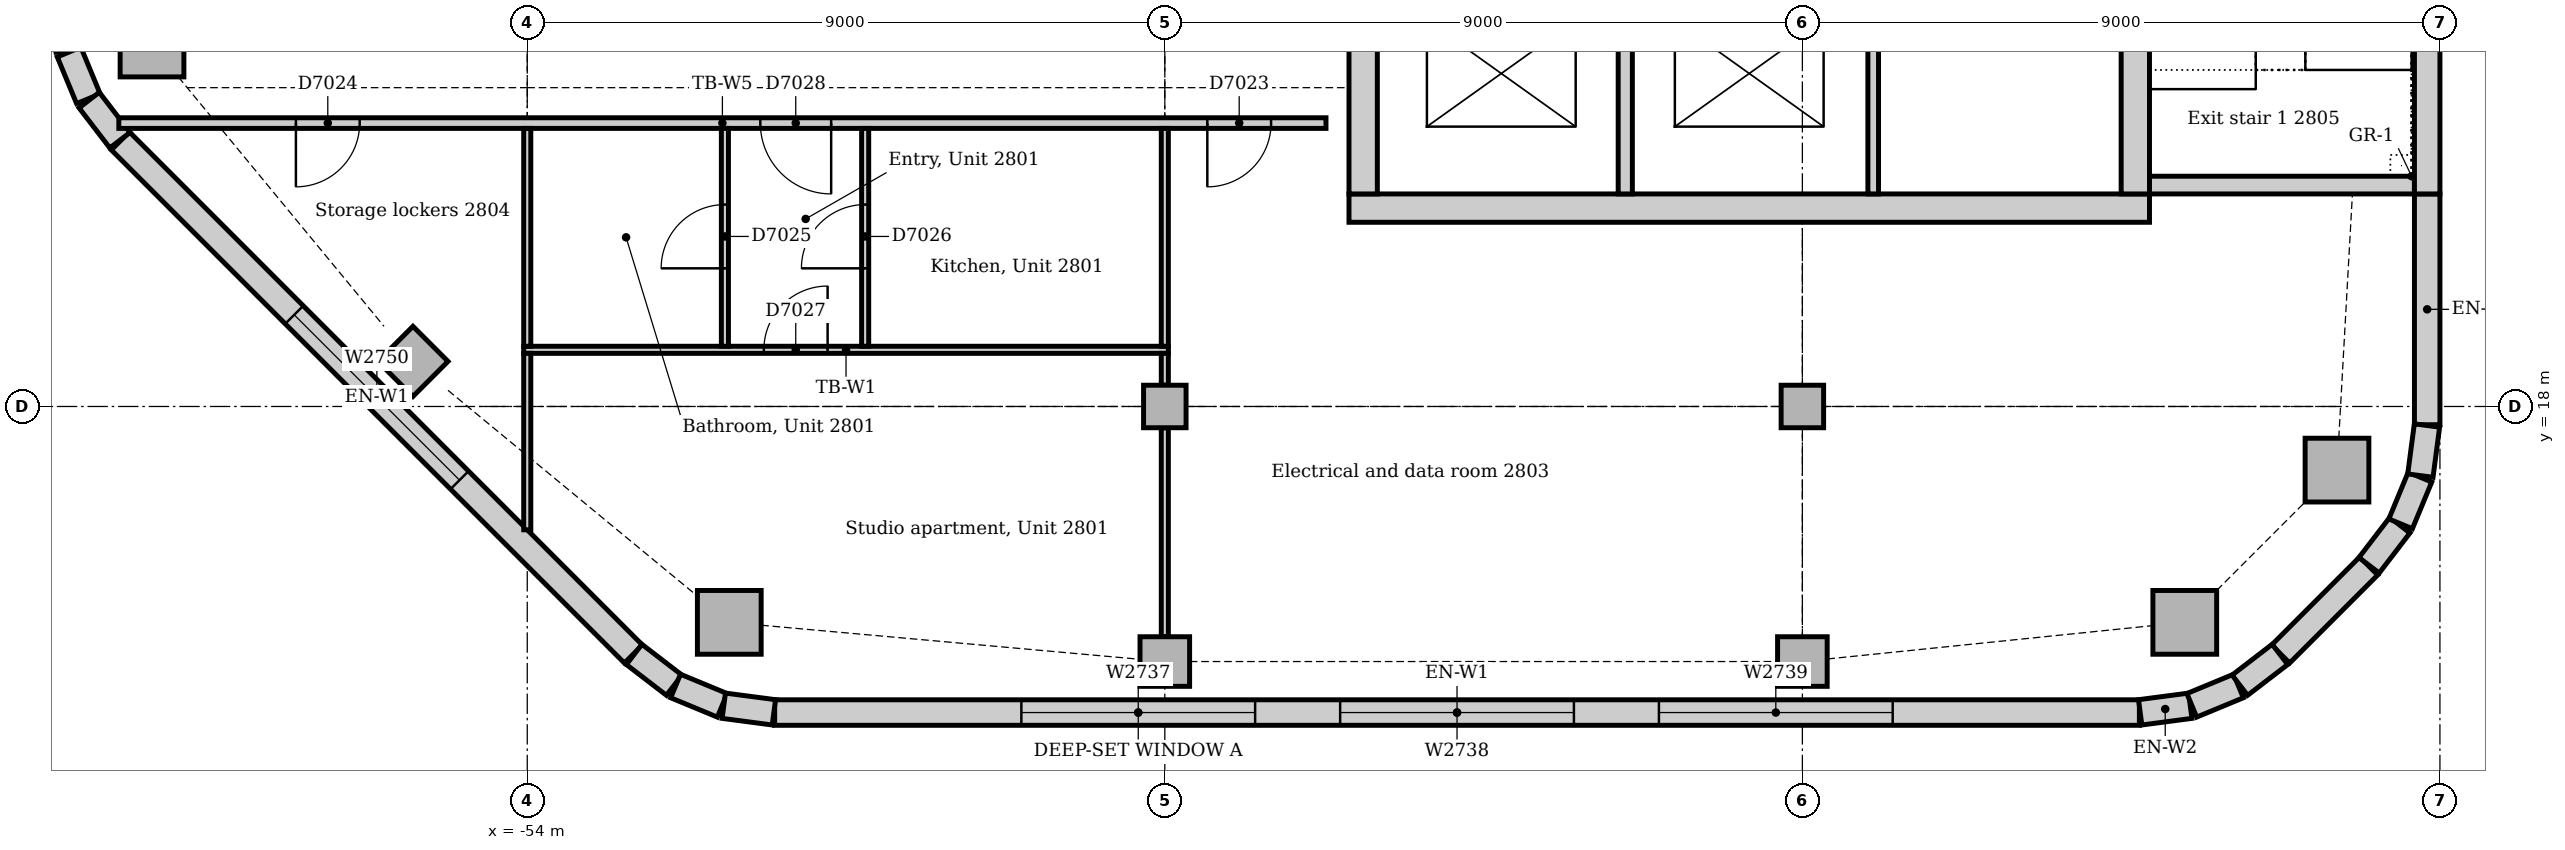
"""IFC4 building model, lengths in metres.
Left out: names, types, materials, properties, quantities, classifications, styles, units other than length and angle.
Written with IfcOpenShell. Run it as: python <this file> out.ifc"""

import sys

from ifc_helpers import new_model, si_unit, direction, frame, frame_2d, origin, origin_2d, place, context, subcontext, project, spatial, rectangle, extrude, element, fill, save


model = new_model("IFC4")
c1 = context("Model", 3, precision=1e-05, world=origin(), true_north=direction((0.0, 1.0)))
c2 = subcontext(c1, "Body", "Model", "MODEL_VIEW")
j1 = project(units=[si_unit("LENGTHUNIT", "METRE"), si_unit("PLANEANGLEUNIT", "RADIAN")], contexts=[c1])
p1 = place(None, origin())
s1 = spatial("IfcSite", under=j1, at=p1, CompositionType="ELEMENT")
p2 = place(p1, origin())
s2 = spatial("IfcBuilding", under=s1, at=p2, CompositionType="ELEMENT")
p3 = place(p2, frame((0.0, 0.0, 120.0)))
s3 = spatial("IfcBuildingStorey", under=s2, at=p3, CompositionType="ELEMENT", Elevation=120.0)
p4 = place(p3, frame((-42.4, 20.8, 0.0), z_axis=(0.0, 0.0, 1.0), x_axis=(1.0, 0.0, 0.0)))
e1 = element("IfcWall", 1, at=p4, inside=s3, PredefinedType="SOLIDWALL", context=c2, shape_type="SweptSolid", body=[
    extrude(rectangle(XDim=11.3, YDim=0.4, at=frame_2d((5.65, 0.0))), origin(), (0.0, 0.0, 1.0), 4.0),
])
p5 = place(p3, frame((-31.3, 21.0, 0.0), z_axis=(0.0, 0.0, 1.0), x_axis=(0.0, 1.0, 0.0)))
e2 = element("IfcWall", 2, at=p5, inside=s3, PredefinedType="SOLIDWALL", context=c2, shape_type="SweptSolid", body=[
    extrude(rectangle(XDim=9.5, YDim=0.4, at=frame_2d((4.75, 0.0))), origin(), (0.0, 0.0, 1.0), 4.0),
])
p6 = place(p5, frame((5.25, 0.0, 0.0)))
e3 = element("IfcOpeningElement", 3, at=p6, cuts=e2, PredefinedType="OPENING", context=c2, shape_type="SweptSolid", body=[
    extrude(rectangle(XDim=1.0, YDim=2.1, at=frame_2d((0.5, 1.05))), frame((0.0, 0.21, 0.0), z_axis=(0.0, -1.0, 0.0), x_axis=(1.0, 0.0, 0.0)), (0.0, 0.0, 1.0), 0.42),
])
p7 = place(p3, frame((-42.2, 30.5, 0.0), z_axis=(0.0, 0.0, 1.0), x_axis=(0.0, -1.0, 0.0)))
e4 = element("IfcWall", 4, at=p7, inside=s3, PredefinedType="SOLIDWALL", context=c2, shape_type="SweptSolid", body=[
    extrude(rectangle(XDim=9.5, YDim=0.4, at=frame_2d((4.75, 0.0))), origin(), (0.0, 0.0, 1.0), 4.0),
])
p8 = place(p7, frame((3.85, 0.0, 0.0)))
e5 = element("IfcOpeningElement", 5, at=p8, cuts=e4, PredefinedType="OPENING", context=c2, shape_type="SweptSolid", body=[
    extrude(rectangle(XDim=1.8, YDim=2.1, at=frame_2d((0.9, 1.05))), frame((0.0, 0.21, 0.0), z_axis=(0.0, -1.0, 0.0), x_axis=(1.0, 0.0, 0.0)), (0.0, 0.0, 1.0), 0.42),
])
p9 = place(p3, frame((-31.1, 21.125, 0.0), z_axis=(0.0, 0.0, 1.0), x_axis=(1.0, 0.0, 0.0)))
e6 = element("IfcWall", 6, at=p9, inside=s3, PredefinedType="SOLIDWALL", context=c2, shape_type="SweptSolid", body=[
    extrude(rectangle(XDim=3.74, YDim=0.25, at=frame_2d((1.87, 0.0))), origin(), (0.0, 0.0, 1.0), 4.0),
])
for number, where, z_axis, x_axis in (
    (7, (-51.148, 14.953, 0.0), (0.0, 0.0, 1.0), (1.0, 0.0, 0.0)),
    (8, (-30.602, 14.953, 0.0), (0.0, 0.0, 1.0), (1.0, 0.0, 0.0)),
    (9, (-28.453, 17.102, 0.0), (0.0, 0.0, 1.0), (1.0, 0.0, 0.0)),
    (10, (-59.297, 23.102, 0.0), (0.0, 0.0, 1.0), (1.0, 0.0, 0.0)),
):
    element("IfcColumn", number, at=place(p3, frame(where, z_axis=z_axis, x_axis=x_axis)), inside=s3, PredefinedType="COLUMN", context=c2, shape_type="SweptSolid", body=[
        extrude(rectangle(XDim=0.9, YDim=0.9, at=origin_2d()), origin(), (0.0, 0.0, 1.0), 3.85),
    ])
for number, where, z_axis, x_axis in (
    (11, (-45.0, 14.4, 0.0), (0.0, 0.0, 1.0), (1.0, 0.0, 0.0)),
    (12, (-36.0, 14.4, 0.0), (0.0, 0.0, 1.0), (1.0, 0.0, 0.0)),
    (13, (-55.614, 18.636, 0.0), (0.0, 0.0, 1.0), (0.707, 0.707, 0.0)),
):
    element("IfcColumn", number, at=place(p3, frame(where, z_axis=z_axis, x_axis=x_axis)), inside=s3, PredefinedType="COLUMN", context=c2, shape_type="SweptSolid", body=[
        extrude(rectangle(XDim=0.7, YDim=0.7, at=origin_2d()), origin(), (0.0, 0.0, 1.0), 3.85),
    ])
for number, where, z_axis, x_axis in (
    (14, (-45.0, 18.0, 0.0), (0.0, 0.0, 1.0), (1.0, 0.0, 0.0)),
    (15, (-36.0, 18.0, 0.0), (0.0, 0.0, 1.0), (1.0, 0.0, 0.0)),
):
    element("IfcColumn", number, at=place(p3, frame(where, z_axis=z_axis, x_axis=x_axis)), inside=s3, PredefinedType="COLUMN", context=c2, shape_type="SweptSolid", body=[
        extrude(rectangle(XDim=0.6, YDim=0.6, at=origin_2d()), origin(), (0.0, 0.0, 1.0), 3.85),
    ])
p10 = place(p3, frame((-50.507, 13.68, 0.0), z_axis=(0.0, 0.0, 1.0), x_axis=(1.0, 0.0, 0.0)))
e16 = element("IfcWall", 16, at=p10, inside=s3, PredefinedType="STANDARD", context=c2, shape_type="SweptSolid", body=[
    extrude(rectangle(XDim=19.265, YDim=0.36, at=frame_2d((9.632, 0.0))), origin(), (0.0, 0.0, 1.0), 3.85),
])
p11 = place(p10, frame((3.482, 0.0, 0.9)))
e17 = element("IfcOpeningElement", 17, at=p11, cuts=e16, PredefinedType="OPENING", context=c2, shape_type="SweptSolid", body=[
    extrude(rectangle(XDim=3.3, YDim=1.6, at=frame_2d((1.65, 0.8))), frame((0.0, 0.19, 0.0), z_axis=(0.0, -1.0, 0.0), x_axis=(1.0, 0.0, 0.0)), (0.0, 0.0, 1.0), 0.38),
])
p12 = place(p10, frame((7.982, 0.0, 0.9)))
e18 = element("IfcOpeningElement", 18, at=p12, cuts=e16, PredefinedType="OPENING", context=c2, shape_type="SweptSolid", body=[
    extrude(rectangle(XDim=3.3, YDim=1.6, at=frame_2d((1.65, 0.8))), frame((0.0, 0.19, 0.0), z_axis=(0.0, -1.0, 0.0), x_axis=(1.0, 0.0, 0.0)), (0.0, 0.0, 1.0), 0.38),
])
p13 = place(p10, frame((12.482, 0.0, 0.9)))
e19 = element("IfcOpeningElement", 19, at=p13, cuts=e16, PredefinedType="OPENING", context=c2, shape_type="SweptSolid", body=[
    extrude(rectangle(XDim=3.3, YDim=1.6, at=frame_2d((1.65, 0.8))), frame((0.0, 0.19, 0.0), z_axis=(0.0, -1.0, 0.0), x_axis=(1.0, 0.0, 0.0)), (0.0, 0.0, 1.0), 0.38),
])
p14 = place(p3, frame((-29.249, 14.506, 0.0), z_axis=(0.0, 0.0, 1.0), x_axis=(0.707106781187, 0.707106781187, 0.0)))
e20 = element("IfcWall", 20, at=p14, inside=s3, PredefinedType="STANDARD", context=c2, shape_type="SweptSolid", body=[
    extrude(rectangle(XDim=1.757, YDim=0.36, at=frame_2d((0.879, 0.0))), origin(), (0.0, 0.0, 1.0), 3.85),
])
p15 = place(p3, frame((-27.18, 17.743, 0.0), z_axis=(0.0, 0.0, 1.0), x_axis=(0.0, 1.0, 0.0)))
e21 = element("IfcWall", 21, at=p15, inside=s3, PredefinedType="STANDARD", context=c2, shape_type="SweptSolid", body=[
    extrude(rectangle(XDim=3.257, YDim=0.36, at=frame_2d((1.629, 0.0))), origin(), (0.0, 0.0, 1.0), 3.85),
])
p16 = place(p3, frame((-27.18, 21.0, 0.0), z_axis=(0.0, 0.0, 1.0), x_axis=(0.0, 1.0, 0.0)))
e22 = element("IfcWall", 22, at=p16, inside=s3, PredefinedType="STANDARD", context=c2, shape_type="SweptSolid", body=[
    extrude(rectangle(XDim=6.75, YDim=0.36, at=frame_2d((3.375, 0.0))), origin(), (0.0, 0.0, 1.0), 3.85),
])
p17 = place(p3, frame((-59.744, 21.749, 0.0), z_axis=(0.0, 0.0, 1.0), x_axis=(0.707106781187, -0.707106781187, 0.0)))
e23 = element("IfcWall", 23, at=p17, inside=s3, PredefinedType="STANDARD", context=c2, shape_type="SweptSolid", body=[
    extrude(rectangle(XDim=10.243, YDim=0.36, at=frame_2d((5.121, 0.0))), origin(), (0.0, 0.0, 1.0), 3.85),
])
p18 = place(p17, frame((3.471, 0.0, 0.9)))
e24 = element("IfcOpeningElement", 24, at=p18, cuts=e23, PredefinedType="OPENING", context=c2, shape_type="SweptSolid", body=[
    extrude(rectangle(XDim=3.3, YDim=1.6, at=frame_2d((1.65, 0.8))), frame((0.0, 0.19, 0.0), z_axis=(0.0, -1.0, 0.0), x_axis=(1.0, 0.0, 0.0)), (0.0, 0.0, 1.0), 0.38),
])
for number, where, z_axis, x_axis in (
    (25, (-31.231, 13.683, 0.0), (0.0, 0.0, 1.0), (0.991, 0.131, 0.0)),
    (26, (-30.503, 13.782, 0.0), (0.0, 0.0, 1.0), (0.924, 0.383, 0.0)),
):
    element("IfcWall", number, at=place(p3, frame(where, z_axis=z_axis, x_axis=x_axis)), inside=s3, PredefinedType="STANDARD", context=c2, shape_type="SweptSolid", body=[
        extrude(rectangle(XDim=0.713, YDim=0.36, at=frame_2d((0.356, 0.0))), origin(), (0.0, 0.0, 1.0), 3.85),
    ])
for number, where, z_axis, x_axis in (
    (27, (-29.825, 14.066, 0.0), (0.0, 0.0, 1.0), (0.793, 0.609, 0.0)),
    (28, (-28.0, 15.759, 0.0), (0.0, 0.0, 1.0), (0.609, 0.793, 0.0)),
):
    element("IfcWall", number, at=place(p3, frame(where, z_axis=z_axis, x_axis=x_axis)), inside=s3, PredefinedType="STANDARD", context=c2, shape_type="SweptSolid", body=[
        extrude(rectangle(XDim=0.713, YDim=0.36, at=frame_2d((0.357, 0.0))), origin(), (0.0, 0.0, 1.0), 3.85),
    ])
for number, where, z_axis, x_axis in (
    (29, (-27.555, 16.344, 0.0), (0.0, 0.0, 1.0), (0.383, 0.924, 0.0)),
    (30, (-27.276, 17.024, 0.0), (0.0, 0.0, 1.0), (0.131, 0.991, 0.0)),
    (31, (-60.468, 23.003, 0.0), (0.0, 0.0, 1.0), (0.383, -0.924, 0.0)),
):
    element("IfcWall", number, at=place(p3, frame(where, z_axis=z_axis, x_axis=x_axis)), inside=s3, PredefinedType="STANDARD", context=c2, shape_type="SweptSolid", body=[
        extrude(rectangle(XDim=0.713, YDim=0.36, at=frame_2d((0.356, 0.0))), origin(), (0.0, 0.0, 1.0), 3.85),
    ])
for number, where, z_axis, x_axis in (
    (32, (-60.184, 22.325, 0.0), (0.0, 0.0, 1.0), (0.609, -0.793, 0.0)),
    (33, (-52.491, 14.5, 0.0), (0.0, 0.0, 1.0), (0.793, -0.609, 0.0)),
):
    element("IfcWall", number, at=place(p3, frame(where, z_axis=z_axis, x_axis=x_axis)), inside=s3, PredefinedType="STANDARD", context=c2, shape_type="SweptSolid", body=[
        extrude(rectangle(XDim=0.713, YDim=0.36, at=frame_2d((0.357, 0.0))), origin(), (0.0, 0.0, 1.0), 3.85),
    ])
for number, where, z_axis, x_axis in (
    (34, (-51.906, 14.055, 0.0), (0.0, 0.0, 1.0), (0.924, -0.383, 0.0)),
    (35, (-51.226, 13.776, 0.0), (0.0, 0.0, 1.0), (0.991, -0.131, 0.0)),
):
    element("IfcWall", number, at=place(p3, frame(where, z_axis=z_axis, x_axis=x_axis)), inside=s3, PredefinedType="STANDARD", context=c2, shape_type="SweptSolid", body=[
        extrude(rectangle(XDim=0.713, YDim=0.36, at=frame_2d((0.356, 0.0))), origin(), (0.0, 0.0, 1.0), 3.85),
    ])
p19 = place(p3, frame((-38.5, 21.0, 0.0), z_axis=(0.0, 0.0, 1.0), x_axis=(0.0, 1.0, 0.0)))
e36 = element("IfcWall", 36, at=p19, inside=s3, PredefinedType="SOLIDWALL", context=c2, shape_type="SweptSolid", body=[
    extrude(rectangle(XDim=3.1, YDim=0.2, at=frame_2d((1.55, 0.0))), origin(), (0.0, 0.0, 1.0), 4.0),
])
p20 = place(p3, frame((-35.0, 21.0, 0.0), z_axis=(0.0, 0.0, 1.0), x_axis=(0.0, 1.0, 0.0)))
e37 = element("IfcWall", 37, at=p20, inside=s3, PredefinedType="SOLIDWALL", context=c2, shape_type="SweptSolid", body=[
    extrude(rectangle(XDim=2.9, YDim=0.15, at=frame_2d((1.45, 0.0))), origin(), (0.0, 0.0, 1.0), 4.0),
])
p21 = place(p3, frame((-59.766, 22.0, 0.0), z_axis=(0.0, 0.0, 1.0), x_axis=(1.0, 0.0, 0.0)))
e38 = element("IfcWall", 38, at=p21, inside=s3, PredefinedType="PARTITIONING", context=c2, shape_type="SweptSolid", body=[
    extrude(rectangle(XDim=17.041, YDim=0.15, at=frame_2d((8.52, 0.0))), origin(), (0.0, 0.0, 1.0), 3.85),
])
p22 = place(p21, frame((15.366, 0.0, 0.0)))
e39 = element("IfcOpeningElement", 39, at=p22, cuts=e38, PredefinedType="OPENING", context=c2, shape_type="SweptSolid", body=[
    extrude(rectangle(XDim=0.9, YDim=2.1, at=frame_2d((0.45, 1.05))), frame((0.0, 0.085, 0.0), z_axis=(0.0, -1.0, 0.0), x_axis=(1.0, 0.0, 0.0)), (0.0, 0.0, 1.0), 0.17),
])
p23 = place(p21, frame((2.5, 0.0, 0.0)))
e40 = element("IfcOpeningElement", 40, at=p23, cuts=e38, PredefinedType="OPENING", context=c2, shape_type="SweptSolid", body=[
    extrude(rectangle(XDim=0.9, YDim=2.1, at=frame_2d((0.45, 1.05))), frame((0.0, 0.085, 0.0), z_axis=(0.0, -1.0, 0.0), x_axis=(1.0, 0.0, 0.0)), (0.0, 0.0, 1.0), 0.17),
])
p24 = place(p21, frame((9.056, 0.0, 0.0)))
e41 = element("IfcOpeningElement", 41, at=p24, cuts=e38, PredefinedType="OPENING", context=c2, shape_type="SweptSolid", body=[
    extrude(rectangle(XDim=1.0, YDim=2.1, at=frame_2d((0.5, 1.05))), frame((0.0, 0.085, 0.0), z_axis=(0.0, -1.0, 0.0), x_axis=(1.0, 0.0, 0.0)), (0.0, 0.0, 1.0), 0.17),
])
p25 = place(p3, frame((-54.05, 18.8, 0.0), z_axis=(0.0, 0.0, 1.0), x_axis=(1.0, 0.0, 0.0)))
e42 = element("IfcWall", 42, at=p25, inside=s3, PredefinedType="PARTITIONING", context=c2, shape_type="SweptSolid", body=[
    extrude(rectangle(XDim=9.1, YDim=0.1, at=frame_2d((4.55, 0.0))), origin(), (0.0, 0.0, 1.0), 3.85),
])
p26 = place(p25, frame((3.39, 0.0, 0.0)))
e43 = element("IfcOpeningElement", 43, at=p26, cuts=e42, PredefinedType="OPENING", context=c2, shape_type="SweptSolid", body=[
    extrude(rectangle(XDim=0.9, YDim=2.1, at=frame_2d((0.45, 1.05))), frame((0.0, 0.06, 0.0), z_axis=(0.0, -1.0, 0.0), x_axis=(1.0, 0.0, 0.0)), (0.0, 0.0, 1.0), 0.12),
])
p27 = place(p3, frame((-45.0, 18.85, 0.0), z_axis=(0.0, 0.0, 1.0), x_axis=(0.0, 1.0, 0.0)))
e44 = element("IfcWall", 44, at=p27, inside=s3, PredefinedType="PARTITIONING", context=c2, shape_type="SweptSolid", body=[
    extrude(rectangle(XDim=3.075, YDim=0.1, at=frame_2d((1.538, 0.0))), origin(), (0.0, 0.0, 1.0), 3.362),
])
p28 = place(p3, frame((-45.0, 18.3, 0.0), z_axis=(0.0, 0.0, 1.0), x_axis=(0.0, 1.0, 0.0)))
e45 = element("IfcWall", 45, at=p28, inside=s3, PredefinedType="PARTITIONING", context=c2, shape_type="SweptSolid", body=[
    extrude(rectangle(XDim=0.45, YDim=0.1, at=frame_2d((0.225, 0.0))), origin(), (0.0, 0.0, 1.0), 3.85),
])
p29 = place(p3, frame((-45.0, 14.75, 0.0), z_axis=(0.0, 0.0, 1.0), x_axis=(0.0, 1.0, 0.0)))
e46 = element("IfcWall", 46, at=p29, inside=s3, PredefinedType="PARTITIONING", context=c2, shape_type="SweptSolid", body=[
    extrude(rectangle(XDim=2.95, YDim=0.1, at=frame_2d((1.475, 0.0))), origin(), (0.0, 0.0, 1.0), 3.652),
])
p30 = place(p3, frame((-54.0, 18.85, 0.0), z_axis=(0.0, 0.0, 1.0), x_axis=(0.0, 1.0, 0.0)))
e47 = element("IfcWall", 47, at=p30, inside=s3, PredefinedType="PARTITIONING", context=c2, shape_type="SweptSolid", body=[
    extrude(rectangle(XDim=3.075, YDim=0.1, at=frame_2d((1.538, 0.0))), origin(), (0.0, 0.0, 1.0), 3.362),
])
p31 = place(p3, frame((-54.0, 16.259, 0.0), z_axis=(0.0, 0.0, 1.0), x_axis=(0.0, 1.0, 0.0)))
e48 = element("IfcWall", 48, at=p31, inside=s3, PredefinedType="PARTITIONING", context=c2, shape_type="SweptSolid", body=[
    extrude(rectangle(XDim=2.491, YDim=0.1, at=frame_2d((1.245, 0.0))), origin(), (0.0, 0.0, 1.0), 3.362),
])
p32 = place(p3, frame((-51.21, 18.85, 0.0), z_axis=(0.0, 0.0, 1.0), x_axis=(0.0, 1.0, 0.0)))
e49 = element("IfcWall", 49, at=p32, inside=s3, PredefinedType="PARTITIONING", context=c2, shape_type="SweptSolid", body=[
    extrude(rectangle(XDim=3.075, YDim=0.1, at=frame_2d((1.538, 0.0))), origin(), (0.0, 0.0, 1.0), 3.85),
])
p33 = place(p32, frame((1.1, 0.0, 0.0)))
e50 = element("IfcOpeningElement", 50, at=p33, cuts=e49, PredefinedType="OPENING", context=c2, shape_type="SweptSolid", body=[
    extrude(rectangle(XDim=0.9, YDim=2.1, at=frame_2d((0.45, 1.05))), frame((0.0, 0.06, 0.0), z_axis=(0.0, -1.0, 0.0), x_axis=(1.0, 0.0, 0.0)), (0.0, 0.0, 1.0), 0.12),
])
p34 = place(p3, frame((-49.23, 18.85, 0.0), z_axis=(0.0, 0.0, 1.0), x_axis=(0.0, 1.0, 0.0)))
e51 = element("IfcWall", 51, at=p34, inside=s3, PredefinedType="PARTITIONING", context=c2, shape_type="SweptSolid", body=[
    extrude(rectangle(XDim=3.075, YDim=0.1, at=frame_2d((1.538, 0.0))), origin(), (0.0, 0.0, 1.0), 3.85),
])
p35 = place(p34, frame((1.1, 0.0, 0.0)))
e52 = element("IfcOpeningElement", 52, at=p35, cuts=e51, PredefinedType="OPENING", context=c2, shape_type="SweptSolid", body=[
    extrude(rectangle(XDim=0.9, YDim=2.1, at=frame_2d((0.45, 1.05))), frame((0.0, 0.06, 0.0), z_axis=(0.0, -1.0, 0.0), x_axis=(1.0, 0.0, 0.0)), (0.0, 0.0, 1.0), 0.12),
])
p36 = place(p11, origin())
e53 = element("IfcWindow", 53, at=p36, inside=s3, PartitioningType="SINGLE_PANEL", PredefinedType="WINDOW", context=c2, shape_type="SweptSolid", body=[
    extrude(rectangle(XDim=3.3, YDim=1.6, at=frame_2d((1.65, 0.8))), frame((0.0, 0.13, 0.0), z_axis=(0.0, -1.0, 0.0), x_axis=(1.0, 0.0, 0.0)), (0.0, 0.0, 1.0), 0.06),
])
fill(e17, e53)
p37 = place(p12, origin())
e54 = element("IfcWindow", 54, at=p37, inside=s3, PartitioningType="SINGLE_PANEL", PredefinedType="WINDOW", context=c2, shape_type="SweptSolid", body=[
    extrude(rectangle(XDim=3.3, YDim=1.6, at=frame_2d((1.65, 0.8))), frame((0.0, 0.13, 0.0), z_axis=(0.0, -1.0, 0.0), x_axis=(1.0, 0.0, 0.0)), (0.0, 0.0, 1.0), 0.06),
])
fill(e18, e54)
p38 = place(p13, origin())
e55 = element("IfcWindow", 55, at=p38, inside=s3, PartitioningType="SINGLE_PANEL", PredefinedType="WINDOW", context=c2, shape_type="SweptSolid", body=[
    extrude(rectangle(XDim=3.3, YDim=1.6, at=frame_2d((1.65, 0.8))), frame((0.0, 0.13, 0.0), z_axis=(0.0, -1.0, 0.0), x_axis=(1.0, 0.0, 0.0)), (0.0, 0.0, 1.0), 0.06),
])
fill(e19, e55)
p39 = place(p18, origin())
e56 = element("IfcWindow", 56, at=p39, inside=s3, PartitioningType="SINGLE_PANEL", PredefinedType="WINDOW", context=c2, shape_type="SweptSolid", body=[
    extrude(rectangle(XDim=3.3, YDim=1.6, at=frame_2d((1.65, 0.8))), frame((0.0, 0.13, 0.0), z_axis=(0.0, -1.0, 0.0), x_axis=(1.0, 0.0, 0.0)), (0.0, 0.0, 1.0), 0.06),
])
fill(e24, e56)
p40 = place(p22, frame((0.9, 0.0, 0.0), z_axis=(0.0, 0.0, 1.0), x_axis=(-1.0, 0.0, 0.0)))
e57 = element("IfcDoor", 57, at=p40, inside=s3, OperationType="SINGLE_SWING_RIGHT", PredefinedType="DOOR", context=c2, shape_type="SweptSolid", body=[
    extrude(rectangle(XDim=0.9, YDim=2.1, at=frame_2d((0.45, 1.05))), frame((0.0, 0.025, 0.0), z_axis=(0.0, -1.0, 0.0), x_axis=(1.0, 0.0, 0.0)), (0.0, 0.0, 1.0), 0.05),
])
fill(e39, e57)
p41 = place(p23, frame((0.9, 0.0, 0.0), z_axis=(0.0, 0.0, 1.0), x_axis=(-1.0, 0.0, 0.0)))
e58 = element("IfcDoor", 58, at=p41, inside=s3, OperationType="SINGLE_SWING_RIGHT", PredefinedType="DOOR", context=c2, shape_type="SweptSolid", body=[
    extrude(rectangle(XDim=0.9, YDim=2.1, at=frame_2d((0.45, 1.05))), frame((0.0, 0.025, 0.0), z_axis=(0.0, -1.0, 0.0), x_axis=(1.0, 0.0, 0.0)), (0.0, 0.0, 1.0), 0.05),
])
fill(e40, e58)
p42 = place(p33, origin())
e59 = element("IfcDoor", 59, at=p42, inside=s3, OperationType="SINGLE_SWING_LEFT", PredefinedType="DOOR", context=c2, shape_type="SweptSolid", body=[
    extrude(rectangle(XDim=0.9, YDim=2.1, at=frame_2d((0.45, 1.05))), frame((0.0, 0.025, 0.0), z_axis=(0.0, -1.0, 0.0), x_axis=(1.0, 0.0, 0.0)), (0.0, 0.0, 1.0), 0.05),
])
fill(e50, e59)
p43 = place(p35, origin())
e60 = element("IfcDoor", 60, at=p43, inside=s3, OperationType="SINGLE_SWING_LEFT", PredefinedType="DOOR", context=c2, shape_type="SweptSolid", body=[
    extrude(rectangle(XDim=0.9, YDim=2.1, at=frame_2d((0.45, 1.05))), frame((0.0, 0.025, 0.0), z_axis=(0.0, -1.0, 0.0), x_axis=(1.0, 0.0, 0.0)), (0.0, 0.0, 1.0), 0.05),
])
fill(e52, e60)
p44 = place(p26, origin())
e61 = element("IfcDoor", 61, at=p44, inside=s3, OperationType="SINGLE_SWING_RIGHT", PredefinedType="DOOR", context=c2, shape_type="SweptSolid", body=[
    extrude(rectangle(XDim=0.9, YDim=2.1, at=frame_2d((0.45, 1.05))), frame((0.0, 0.025, 0.0), z_axis=(0.0, -1.0, 0.0), x_axis=(1.0, 0.0, 0.0)), (0.0, 0.0, 1.0), 0.05),
])
fill(e43, e61)
p45 = place(p24, frame((1.0, 0.0, 0.0), z_axis=(0.0, 0.0, 1.0), x_axis=(-1.0, 0.0, 0.0)))
e62 = element("IfcDoor", 62, at=p45, inside=s3, OperationType="SINGLE_SWING_LEFT", PredefinedType="DOOR", context=c2, shape_type="SweptSolid", body=[
    extrude(rectangle(XDim=1.0, YDim=2.1, at=frame_2d((0.5, 1.05))), frame((0.0, 0.025, 0.0), z_axis=(0.0, -1.0, 0.0), x_axis=(1.0, 0.0, 0.0)), (0.0, 0.0, 1.0), 0.05),
])
fill(e41, e62)
save(model, sys.argv[1])
